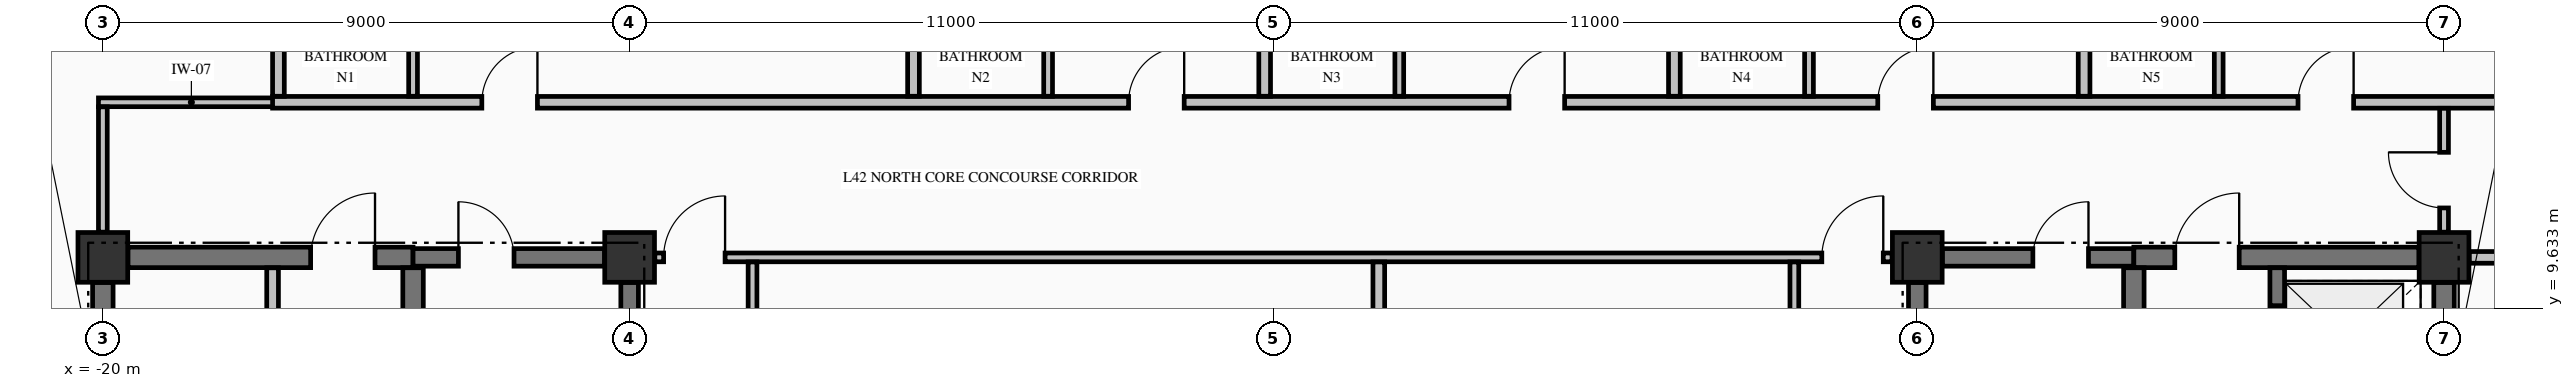
"""IFC4 building model, lengths in metres.
Left out: names, types, materials, properties, quantities, classifications, styles, units other than length and angle.
Written with IfcOpenShell. Run it as: python <this file> out.ifc"""

import sys

from ifc_helpers import new_model, si_unit, direction, frame, frame_2d, origin, origin_2d, place, context, subcontext, project, spatial, rectangle, extrude, element, fill, save


model = new_model("IFC4")
c1 = context("Model", 3, precision=1e-05, world=origin(), true_north=direction((0.0, 1.0)))
c2 = subcontext(c1, "Body", "Model", "MODEL_VIEW")
j1 = project(units=[si_unit("LENGTHUNIT", "METRE"), si_unit("PLANEANGLEUNIT", "RADIAN")], contexts=[c1])
p1 = place(None, origin())
s1 = spatial("IfcSite", under=j1, at=p1, CompositionType="ELEMENT")
p2 = place(p1, origin())
s2 = spatial("IfcBuilding", under=s1, at=p2, CompositionType="ELEMENT")
p3 = place(p2, frame((0.0, 0.0, 166.06)))
s3 = spatial("IfcBuildingStorey", under=s2, at=p3, CompositionType="ELEMENT", Elevation=166.06)
for number, where, z_axis, x_axis in (
    (1, (-20.0, 10.5, -0.25), (0.0, 0.0, 1.0), (1.0, 0.0, 0.0)),
    (2, (-11.0, 10.5, -0.25), (0.0, 0.0, 1.0), (1.0, 0.0, 0.0)),
    (3, (11.0, 10.5, -0.25), (0.0, 0.0, 1.0), (1.0, 0.0, 0.0)),
    (4, (20.0, 10.5, -0.25), (0.0, 0.0, 1.0), (1.0, 0.0, 0.0)),
):
    element("IfcColumn", number, at=place(p3, frame(where, z_axis=z_axis, x_axis=x_axis)), inside=s3, PredefinedType="COLUMN", context=c2, shape_type="SweptSolid", body=[
        extrude(rectangle(XDim=0.85, YDim=0.85, at=origin_2d()), origin(), (0.0, 0.0, 1.0), 3.4),
    ])
p4 = place(p3, frame((-19.571, 10.5, 0.0), z_axis=(0.0, 0.0, 1.0), x_axis=(1.0, 0.0, 0.0)))
e5 = element("IfcWall", 5, at=p4, inside=s3, PredefinedType="SHEAR", context=c2, shape_type="SweptSolid", body=[
    extrude(rectangle(XDim=4.871, YDim=0.35, at=frame_2d((2.436, 0.0))), origin(), (0.0, 0.0, 1.0), 3.15),
])
p5 = place(p4, frame((3.121, 0.0, 0.0)))
e6 = element("IfcOpeningElement", 6, at=p5, cuts=e5, PredefinedType="OPENING", context=c2, shape_type="SweptSolid", body=[
    extrude(rectangle(XDim=1.1, YDim=2.15, at=frame_2d((0.55, 1.075))), frame((0.0, 0.185, 0.0), z_axis=(0.0, -1.0, 0.0), x_axis=(1.0, 0.0, 0.0)), (0.0, 0.0, 1.0), 0.37),
])
p6 = place(p3, frame((-14.7, 10.5, 0.0), z_axis=(0.0, 0.0, 1.0), x_axis=(1.0, 0.0, 0.0)))
e7 = element("IfcWall", 7, at=p6, inside=s3, PredefinedType="SHEAR", context=c2, shape_type="SweptSolid", body=[
    extrude(rectangle(XDim=3.271, YDim=0.3, at=frame_2d((1.635, 0.0))), origin(), (0.0, 0.0, 1.0), 3.15),
])
p7 = place(p6, frame((0.775, 0.0, 0.0)))
e8 = element("IfcOpeningElement", 8, at=p7, cuts=e7, PredefinedType="OPENING", context=c2, shape_type="SweptSolid", body=[
    extrude(rectangle(XDim=0.95, YDim=2.15, at=frame_2d((0.475, 1.075))), frame((0.0, 0.16, 0.0), z_axis=(0.0, -1.0, 0.0), x_axis=(1.0, 0.0, 0.0)), (0.0, 0.0, 1.0), 0.32),
])
p8 = place(p3, frame((11.429, 10.5, 0.0), z_axis=(0.0, 0.0, 1.0), x_axis=(1.0, 0.0, 0.0)))
e9 = element("IfcWall", 9, at=p8, inside=s3, PredefinedType="SHEAR", context=c2, shape_type="SweptSolid", body=[
    extrude(rectangle(XDim=3.271, YDim=0.3, at=frame_2d((1.635, 0.0))), origin(), (0.0, 0.0, 1.0), 3.15),
])
p9 = place(p8, frame((1.546, 0.0, 0.0)))
e10 = element("IfcOpeningElement", 10, at=p9, cuts=e9, PredefinedType="OPENING", context=c2, shape_type="SweptSolid", body=[
    extrude(rectangle(XDim=0.95, YDim=2.15, at=frame_2d((0.475, 1.075))), frame((0.0, 0.16, 0.0), z_axis=(0.0, -1.0, 0.0), x_axis=(1.0, 0.0, 0.0)), (0.0, 0.0, 1.0), 0.32),
])
p10 = place(p3, frame((14.7, 10.5, 0.0), z_axis=(0.0, 0.0, 1.0), x_axis=(1.0, 0.0, 0.0)))
e11 = element("IfcWall", 11, at=p10, inside=s3, PredefinedType="SHEAR", context=c2, shape_type="SweptSolid", body=[
    extrude(rectangle(XDim=4.871, YDim=0.35, at=frame_2d((2.436, 0.0))), origin(), (0.0, 0.0, 1.0), 3.15),
])
p11 = place(p10, frame((0.7, 0.0, 0.0)))
e12 = element("IfcOpeningElement", 12, at=p11, cuts=e11, PredefinedType="OPENING", context=c2, shape_type="SweptSolid", body=[
    extrude(rectangle(XDim=1.1, YDim=2.15, at=frame_2d((0.55, 1.075))), frame((0.0, 0.185, 0.0), z_axis=(0.0, -1.0, 0.0), x_axis=(1.0, 0.0, 0.0)), (0.0, 0.0, 1.0), 0.37),
])
p12 = place(p3, frame((-10.569, 10.5, 0.0), z_axis=(0.0, 0.0, 1.0), x_axis=(1.0, 0.0, 0.0)))
e13 = element("IfcWall", 13, at=p12, inside=s3, PredefinedType="PARTITIONING", context=c2, shape_type="SweptSolid", body=[
    extrude(rectangle(XDim=21.138, YDim=0.15, at=frame_2d((10.569, 0.0))), origin(), (0.0, 0.0, 1.0), 3.15),
])
p13 = place(p12, frame((0.15, 0.0, 0.0)))
e14 = element("IfcOpeningElement", 14, at=p13, cuts=e13, PredefinedType="OPENING", context=c2, shape_type="SweptSolid", body=[
    extrude(rectangle(XDim=1.05, YDim=2.15, at=frame_2d((0.525, 1.075))), frame((0.0, 0.085, 0.0), z_axis=(0.0, -1.0, 0.0), x_axis=(1.0, 0.0, 0.0)), (0.0, 0.0, 1.0), 0.17),
])
p14 = place(p12, frame((19.938, 0.0, 0.0)))
e15 = element("IfcOpeningElement", 15, at=p14, cuts=e13, PredefinedType="OPENING", context=c2, shape_type="SweptSolid", body=[
    extrude(rectangle(XDim=1.05, YDim=2.15, at=frame_2d((0.525, 1.075))), frame((0.0, 0.085, 0.0), z_axis=(0.0, -1.0, 0.0), x_axis=(1.0, 0.0, 0.0)), (0.0, 0.0, 1.0), 0.17),
])
p15 = place(p3, frame((20.431, 10.5, 0.0), z_axis=(0.0, 0.0, 1.0), x_axis=(1.0, 0.0, 0.0)))
e16 = element("IfcWall", 16, at=p15, inside=s3, PredefinedType="PARTITIONING", context=c2, shape_type="SweptSolid", body=[
    extrude(rectangle(XDim=6.404, YDim=0.2, at=frame_2d((3.202, 0.0))), origin(), (0.0, 0.0, 1.0), 3.15),
])
p16 = place(p15, frame((2.594, 0.0, 0.0)))
e17 = element("IfcOpeningElement", 17, at=p16, cuts=e16, PredefinedType="OPENING", context=c2, shape_type="SweptSolid", body=[
    extrude(rectangle(XDim=0.95, YDim=2.15, at=frame_2d((0.475, 1.075))), frame((0.0, 0.11, 0.0), z_axis=(0.0, -1.0, 0.0), x_axis=(1.0, 0.0, 0.0)), (0.0, 0.0, 1.0), 0.22),
])
p17 = place(p3, frame((-20.075, 13.15, 0.0), z_axis=(0.0, 0.0, 1.0), x_axis=(1.0, 0.0, 0.0)))
e18 = element("IfcWall", 18, at=p17, inside=s3, PredefinedType="PARTITIONING", context=c2, shape_type="SweptSolid", body=[
    extrude(rectangle(XDim=3.175, YDim=0.15, at=frame_2d((1.587, 0.0))), origin(), (0.0, 0.0, 1.0), 3.15),
])
p18 = place(p3, frame((-17.1, 13.15, 0.0), z_axis=(0.0, 0.0, 1.0), x_axis=(1.0, 0.0, 0.0)))
e19 = element("IfcWall", 19, at=p18, inside=s3, PredefinedType="PARTITIONING", context=c2, shape_type="SweptSolid", body=[
    extrude(rectangle(XDim=39.2, YDim=0.2, at=frame_2d((19.6, 0.0))), origin(), (0.0, 0.0, 1.0), 3.15),
])
p19 = place(p18, frame((3.575, 0.0, 0.0)))
e20 = element("IfcOpeningElement", 20, at=p19, cuts=e19, PredefinedType="OPENING", context=c2, shape_type="SweptSolid", body=[
    extrude(rectangle(XDim=0.95, YDim=2.15, at=frame_2d((0.475, 1.075))), frame((0.0, 0.11, 0.0), z_axis=(0.0, -1.0, 0.0), x_axis=(1.0, 0.0, 0.0)), (0.0, 0.0, 1.0), 0.22),
])
p20 = place(p18, frame((14.625, 0.0, 0.0)))
e21 = element("IfcOpeningElement", 21, at=p20, cuts=e19, PredefinedType="OPENING", context=c2, shape_type="SweptSolid", body=[
    extrude(rectangle(XDim=0.95, YDim=2.15, at=frame_2d((0.475, 1.075))), frame((0.0, 0.11, 0.0), z_axis=(0.0, -1.0, 0.0), x_axis=(1.0, 0.0, 0.0)), (0.0, 0.0, 1.0), 0.22),
])
p21 = place(p18, frame((21.125, 0.0, 0.0)))
e22 = element("IfcOpeningElement", 22, at=p21, cuts=e19, PredefinedType="OPENING", context=c2, shape_type="SweptSolid", body=[
    extrude(rectangle(XDim=0.95, YDim=2.15, at=frame_2d((0.475, 1.075))), frame((0.0, 0.11, 0.0), z_axis=(0.0, -1.0, 0.0), x_axis=(1.0, 0.0, 0.0)), (0.0, 0.0, 1.0), 0.22),
])
p22 = place(p18, frame((27.425, 0.0, 0.0)))
e23 = element("IfcOpeningElement", 23, at=p22, cuts=e19, PredefinedType="OPENING", context=c2, shape_type="SweptSolid", body=[
    extrude(rectangle(XDim=0.95, YDim=2.15, at=frame_2d((0.475, 1.075))), frame((0.0, 0.11, 0.0), z_axis=(0.0, -1.0, 0.0), x_axis=(1.0, 0.0, 0.0)), (0.0, 0.0, 1.0), 0.22),
])
p23 = place(p18, frame((34.605, 0.0, 0.0)))
e24 = element("IfcOpeningElement", 24, at=p23, cuts=e19, PredefinedType="OPENING", context=c2, shape_type="SweptSolid", body=[
    extrude(rectangle(XDim=0.95, YDim=2.15, at=frame_2d((0.475, 1.075))), frame((0.0, 0.11, 0.0), z_axis=(0.0, -1.0, 0.0), x_axis=(1.0, 0.0, 0.0)), (0.0, 0.0, 1.0), 0.22),
])
p24 = place(p3, frame((-20.0, 5.327, 0.0), z_axis=(0.0, 0.0, 1.0), x_axis=(0.0, 1.0, 0.0)))
e25 = element("IfcWall", 25, at=p24, inside=s3, PredefinedType="SHEAR", context=c2, shape_type="SweptSolid", body=[
    extrude(rectangle(XDim=4.744, YDim=0.35, at=frame_2d((2.372, 0.0))), origin(), (0.0, 0.0, 1.0), 3.15),
])
p25 = place(p3, frame((-14.7, 5.852, 0.0), z_axis=(0.0, 0.0, 1.0), x_axis=(0.0, 1.0, 0.0)))
e26 = element("IfcWall", 26, at=p25, inside=s3, PredefinedType="SHEAR", context=c2, shape_type="SweptSolid", body=[
    extrude(rectangle(XDim=4.471, YDim=0.35, at=frame_2d((2.235, 0.0))), origin(), (0.0, 0.0, 1.0), 3.15),
])
for number, where, z_axis, x_axis in (
    (27, (-11.0, 5.852, 0.0), (0.0, 0.0, 1.0), (0.0, 1.0, 0.0)),
    (28, (11.0, 5.852, 0.0), (0.0, 0.0, 1.0), (0.0, 1.0, 0.0)),
):
    element("IfcWall", number, at=place(p3, frame(where, z_axis=z_axis, x_axis=x_axis)), inside=s3, PredefinedType="SHEAR", context=c2, shape_type="SweptSolid", body=[
        extrude(rectangle(XDim=4.219, YDim=0.3, at=frame_2d((2.109, 0.0))), origin(), (0.0, 0.0, 1.0), 3.15),
    ])
p26 = place(p3, frame((14.7, 5.852, 0.0), z_axis=(0.0, 0.0, 1.0), x_axis=(0.0, 1.0, 0.0)))
e29 = element("IfcWall", 29, at=p26, inside=s3, PredefinedType="SHEAR", context=c2, shape_type="SweptSolid", body=[
    extrude(rectangle(XDim=4.471, YDim=0.35, at=frame_2d((2.235, 0.0))), origin(), (0.0, 0.0, 1.0), 3.15),
])
p27 = place(p3, frame((17.15, 7.877, 0.0), z_axis=(0.0, 0.0, 1.0), x_axis=(0.0, 1.0, 0.0)))
e30 = element("IfcWall", 30, at=p27, inside=s3, PredefinedType="SOLIDWALL", context=c2, shape_type="SweptSolid", body=[
    extrude(rectangle(XDim=2.446, YDim=0.25, at=frame_2d((1.223, 0.0))), origin(), (0.0, 0.0, 1.0), 3.15),
])
p28 = place(p27, frame((0.698, 0.0, 0.0)))
e31 = element("IfcOpeningElement", 31, at=p28, cuts=e30, PredefinedType="OPENING", context=c2, shape_type="SweptSolid", body=[
    extrude(rectangle(XDim=1.1, YDim=2.2, at=frame_2d((0.55, 1.1))), frame((0.0, 0.135, 0.0), z_axis=(0.0, -1.0, 0.0), x_axis=(1.0, 0.0, 0.0)), (0.0, 0.0, 1.0), 0.27),
])
p29 = place(p3, frame((20.0, 7.877, 0.0), z_axis=(0.0, 0.0, 1.0), x_axis=(0.0, 1.0, 0.0)))
e32 = element("IfcWall", 32, at=p29, inside=s3, PredefinedType="SHEAR", context=c2, shape_type="SweptSolid", body=[
    extrude(rectangle(XDim=2.194, YDim=0.35, at=frame_2d((1.097, 0.0))), origin(), (0.0, 0.0, 1.0), 3.15),
])
p30 = place(p3, frame((-20.0, 10.931, 0.0), z_axis=(0.0, 0.0, 1.0), x_axis=(0.0, 1.0, 0.0)))
e33 = element("IfcWall", 33, at=p30, inside=s3, PredefinedType="PARTITIONING", context=c2, shape_type="SweptSolid", body=[
    extrude(rectangle(XDim=2.141, YDim=0.15, at=frame_2d((1.071, 0.0))), origin(), (0.0, 0.0, 1.0), 2.342),
])
p31 = place(p3, frame((-17.1, 5.328, 0.0), z_axis=(0.0, 0.0, 1.0), x_axis=(0.0, 1.0, 0.0)))
e34 = element("IfcWall", 34, at=p31, inside=s3, PredefinedType="PARTITIONING", context=c2, shape_type="SweptSolid", body=[
    extrude(rectangle(XDim=4.994, YDim=0.2, at=frame_2d((2.497, 0.0))), origin(), (0.0, 0.0, 1.0), 3.15),
])
p32 = place(p31, frame((2.072, 0.0, 0.0)))
e35 = element("IfcOpeningElement", 35, at=p32, cuts=e34, PredefinedType="OPENING", context=c2, shape_type="SweptSolid", body=[
    extrude(rectangle(XDim=0.9, YDim=2.15, at=frame_2d((0.45, 1.075))), frame((0.0, 0.11, 0.0), z_axis=(0.0, -1.0, 0.0), x_axis=(1.0, 0.0, 0.0)), (0.0, 0.0, 1.0), 0.22),
])
p33 = place(p3, frame((-17.0, 13.253, 0.0), z_axis=(0.0, 0.0, 1.0), x_axis=(0.0, 1.0, 0.0)))
e36 = element("IfcWall", 36, at=p33, inside=s3, PredefinedType="PARTITIONING", context=c2, shape_type="SweptSolid", body=[
    extrude(rectangle(XDim=2.669, YDim=0.2, at=frame_2d((1.334, 0.0))), origin(), (0.0, 0.0, 1.0), 3.15),
])
p34 = place(p3, frame((-14.7, 13.253, 0.0), z_axis=(0.0, 0.0, 1.0), x_axis=(0.0, 1.0, 0.0)))
e37 = element("IfcWall", 37, at=p34, inside=s3, PredefinedType="PARTITIONING", context=c2, shape_type="SweptSolid", body=[
    extrude(rectangle(XDim=2.669, YDim=0.15, at=frame_2d((1.334, 0.0))), origin(), (0.0, 0.0, 1.0), 3.15),
])
p35 = place(p3, frame((-8.9, -3.297, 0.0), z_axis=(0.0, 0.0, 1.0), x_axis=(0.0, 1.0, 0.0)))
e38 = element("IfcWall", 38, at=p35, inside=s3, PredefinedType="PARTITIONING", context=c2, shape_type="SweptSolid", body=[
    extrude(rectangle(XDim=13.719, YDim=0.15, at=frame_2d((6.86, 0.0))), origin(), (0.0, 0.0, 1.0), 3.15),
])
p36 = place(p35, frame((6.297, 0.0, 0.0)))
e39 = element("IfcOpeningElement", 39, at=p36, cuts=e38, PredefinedType="OPENING", context=c2, shape_type="SweptSolid", body=[
    extrude(rectangle(XDim=1.1, YDim=2.15, at=frame_2d((0.55, 1.075))), frame((0.0, 0.085, 0.0), z_axis=(0.0, -1.0, 0.0), x_axis=(1.0, 0.0, 0.0)), (0.0, 0.0, 1.0), 0.17),
])
p37 = place(p3, frame((-6.15, 13.253, 0.0), z_axis=(0.0, 0.0, 1.0), x_axis=(0.0, 1.0, 0.0)))
e40 = element("IfcWall", 40, at=p37, inside=s3, PredefinedType="PARTITIONING", context=c2, shape_type="SweptSolid", body=[
    extrude(rectangle(XDim=2.669, YDim=0.2, at=frame_2d((1.334, 0.0))), origin(), (0.0, 0.0, 1.0), 3.15),
])
p38 = place(p3, frame((-3.85, 13.253, 0.0), z_axis=(0.0, 0.0, 1.0), x_axis=(0.0, 1.0, 0.0)))
e41 = element("IfcWall", 41, at=p38, inside=s3, PredefinedType="PARTITIONING", context=c2, shape_type="SweptSolid", body=[
    extrude(rectangle(XDim=2.669, YDim=0.15, at=frame_2d((1.334, 0.0))), origin(), (0.0, 0.0, 1.0), 3.15),
])
p39 = place(p3, frame((-0.15, 13.253, 0.0), z_axis=(0.0, 0.0, 1.0), x_axis=(0.0, 1.0, 0.0)))
e42 = element("IfcWall", 42, at=p39, inside=s3, PredefinedType="PARTITIONING", context=c2, shape_type="SweptSolid", body=[
    extrude(rectangle(XDim=2.669, YDim=0.2, at=frame_2d((1.334, 0.0))), origin(), (0.0, 0.0, 1.0), 2.342),
])
p40 = place(p3, frame((1.8, -2.097, 0.0), z_axis=(0.0, 0.0, 1.0), x_axis=(0.0, 1.0, 0.0)))
e43 = element("IfcWall", 43, at=p40, inside=s3, PredefinedType="PARTITIONING", context=c2, shape_type="SweptSolid", body=[
    extrude(rectangle(XDim=12.519, YDim=0.2, at=frame_2d((6.26, 0.0))), origin(), (0.0, 0.0, 1.0), 3.15),
])
p41 = place(p3, frame((2.15, 13.253, 0.0), z_axis=(0.0, 0.0, 1.0), x_axis=(0.0, 1.0, 0.0)))
e44 = element("IfcWall", 44, at=p41, inside=s3, PredefinedType="PARTITIONING", context=c2, shape_type="SweptSolid", body=[
    extrude(rectangle(XDim=2.669, YDim=0.15, at=frame_2d((1.334, 0.0))), origin(), (0.0, 0.0, 1.0), 3.15),
])
p42 = place(p3, frame((6.85, 13.253, 0.0), z_axis=(0.0, 0.0, 1.0), x_axis=(0.0, 1.0, 0.0)))
e45 = element("IfcWall", 45, at=p42, inside=s3, PredefinedType="PARTITIONING", context=c2, shape_type="SweptSolid", body=[
    extrude(rectangle(XDim=2.669, YDim=0.2, at=frame_2d((1.334, 0.0))), origin(), (0.0, 0.0, 1.0), 3.15),
])
p43 = place(p3, frame((8.9, -2.097, 0.0), z_axis=(0.0, 0.0, 1.0), x_axis=(0.0, 1.0, 0.0)))
e46 = element("IfcWall", 46, at=p43, inside=s3, PredefinedType="PARTITIONING", context=c2, shape_type="SweptSolid", body=[
    extrude(rectangle(XDim=12.519, YDim=0.15, at=frame_2d((6.26, 0.0))), origin(), (0.0, 0.0, 1.0), 3.15),
])
p44 = place(p43, frame((5.697, 0.0, 0.0)))
e47 = element("IfcOpeningElement", 47, at=p44, cuts=e46, PredefinedType="OPENING", context=c2, shape_type="SweptSolid", body=[
    extrude(rectangle(XDim=1.1, YDim=2.15, at=frame_2d((0.55, 1.075))), frame((0.0, 0.085, 0.0), z_axis=(0.0, -1.0, 0.0), x_axis=(1.0, 0.0, 0.0)), (0.0, 0.0, 1.0), 0.17),
])
p45 = place(p3, frame((9.15, 13.253, 0.0), z_axis=(0.0, 0.0, 1.0), x_axis=(0.0, 1.0, 0.0)))
e48 = element("IfcWall", 48, at=p45, inside=s3, PredefinedType="PARTITIONING", context=c2, shape_type="SweptSolid", body=[
    extrude(rectangle(XDim=2.669, YDim=0.15, at=frame_2d((1.334, 0.0))), origin(), (0.0, 0.0, 1.0), 3.15),
])
p46 = place(p3, frame((13.85, 13.253, 0.0), z_axis=(0.0, 0.0, 1.0), x_axis=(0.0, 1.0, 0.0)))
e49 = element("IfcWall", 49, at=p46, inside=s3, PredefinedType="PARTITIONING", context=c2, shape_type="SweptSolid", body=[
    extrude(rectangle(XDim=2.669, YDim=0.2, at=frame_2d((1.334, 0.0))), origin(), (0.0, 0.0, 1.0), 3.15),
])
p47 = place(p3, frame((16.15, 13.253, 0.0), z_axis=(0.0, 0.0, 1.0), x_axis=(0.0, 1.0, 0.0)))
e50 = element("IfcWall", 50, at=p47, inside=s3, PredefinedType="PARTITIONING", context=c2, shape_type="SweptSolid", body=[
    extrude(rectangle(XDim=2.669, YDim=0.15, at=frame_2d((1.334, 0.0))), origin(), (0.0, 0.0, 1.0), 3.15),
])
p48 = place(p3, frame((20.0, 10.931, 0.0), z_axis=(0.0, 0.0, 1.0), x_axis=(0.0, 1.0, 0.0)))
e51 = element("IfcWall", 51, at=p48, inside=s3, PredefinedType="PARTITIONING", context=c2, shape_type="SweptSolid", body=[
    extrude(rectangle(XDim=2.116, YDim=0.15, at=frame_2d((1.058, 0.0))), origin(), (0.0, 0.0, 1.0), 2.342),
])
p49 = place(p48, frame((0.414, 0.0, 0.0)))
e52 = element("IfcOpeningElement", 52, at=p49, cuts=e51, PredefinedType="OPENING", context=c2, shape_type="SweptSolid", body=[
    extrude(rectangle(XDim=0.95, YDim=2.15, at=frame_2d((0.475, 1.075))), frame((0.0, 0.085, 0.0), z_axis=(0.0, -1.0, 0.0), x_axis=(1.0, 0.0, 0.0)), (0.0, 0.0, 1.0), 0.17),
])
p50 = place(p7, origin())
e53 = element("IfcDoor", 53, at=p50, inside=s3, OperationType="SINGLE_SWING_LEFT", PredefinedType="DOOR", context=c2, shape_type="SweptSolid", body=[
    extrude(rectangle(XDim=0.95, YDim=2.15, at=frame_2d((0.475, 1.075))), frame((0.0, 0.025, 0.0), z_axis=(0.0, -1.0, 0.0), x_axis=(1.0, 0.0, 0.0)), (0.0, 0.0, 1.0), 0.05),
])
fill(e8, e53)
p51 = place(p9, origin())
e54 = element("IfcDoor", 54, at=p51, inside=s3, OperationType="SINGLE_SWING_RIGHT", PredefinedType="DOOR", context=c2, shape_type="SweptSolid", body=[
    extrude(rectangle(XDim=0.95, YDim=2.15, at=frame_2d((0.475, 1.075))), frame((0.0, 0.025, 0.0), z_axis=(0.0, -1.0, 0.0), x_axis=(1.0, 0.0, 0.0)), (0.0, 0.0, 1.0), 0.05),
])
fill(e10, e54)
p52 = place(p5, origin())
e55 = element("IfcDoor", 55, at=p52, inside=s3, OperationType="SINGLE_SWING_RIGHT", PredefinedType="DOOR", context=c2, shape_type="SweptSolid", body=[
    extrude(rectangle(XDim=1.1, YDim=2.15, at=frame_2d((0.55, 1.075))), frame((0.0, 0.025, 0.0), z_axis=(0.0, -1.0, 0.0), x_axis=(1.0, 0.0, 0.0)), (0.0, 0.0, 1.0), 0.05),
])
fill(e6, e55)
p53 = place(p28, origin())
e56 = element("IfcDoor", 56, at=p53, inside=s3, OperationType="SLIDING_TO_RIGHT", PredefinedType="DOOR", context=c2, shape_type="SweptSolid", body=[
    extrude(rectangle(XDim=1.1, YDim=2.2, at=frame_2d((0.55, 1.1))), frame((0.0, 0.025, 0.0), z_axis=(0.0, -1.0, 0.0), x_axis=(1.0, 0.0, 0.0)), (0.0, 0.0, 1.0), 0.05),
])
fill(e31, e56)
p54 = place(p11, origin())
e57 = element("IfcDoor", 57, at=p54, inside=s3, OperationType="SINGLE_SWING_RIGHT", PredefinedType="DOOR", context=c2, shape_type="SweptSolid", body=[
    extrude(rectangle(XDim=1.1, YDim=2.15, at=frame_2d((0.55, 1.075))), frame((0.0, 0.025, 0.0), z_axis=(0.0, -1.0, 0.0), x_axis=(1.0, 0.0, 0.0)), (0.0, 0.0, 1.0), 0.05),
])
fill(e12, e57)
p55 = place(p13, origin())
e58 = element("IfcDoor", 58, at=p55, inside=s3, OperationType="SINGLE_SWING_RIGHT", PredefinedType="DOOR", context=c2, shape_type="SweptSolid", body=[
    extrude(rectangle(XDim=1.05, YDim=2.15, at=frame_2d((0.525, 1.075))), frame((0.0, 0.025, 0.0), z_axis=(0.0, -1.0, 0.0), x_axis=(1.0, 0.0, 0.0)), (0.0, 0.0, 1.0), 0.05),
])
fill(e14, e58)
p56 = place(p14, origin())
e59 = element("IfcDoor", 59, at=p56, inside=s3, OperationType="SINGLE_SWING_RIGHT", PredefinedType="DOOR", context=c2, shape_type="SweptSolid", body=[
    extrude(rectangle(XDim=1.05, YDim=2.15, at=frame_2d((0.525, 1.075))), frame((0.0, 0.025, 0.0), z_axis=(0.0, -1.0, 0.0), x_axis=(1.0, 0.0, 0.0)), (0.0, 0.0, 1.0), 0.05),
])
fill(e15, e59)
p57 = place(p19, origin())
e60 = element("IfcDoor", 60, at=p57, inside=s3, OperationType="SINGLE_SWING_RIGHT", PredefinedType="DOOR", context=c2, shape_type="SweptSolid", body=[
    extrude(rectangle(XDim=0.95, YDim=2.15, at=frame_2d((0.475, 1.075))), frame((0.0, 0.025, 0.0), z_axis=(0.0, -1.0, 0.0), x_axis=(1.0, 0.0, 0.0)), (0.0, 0.0, 1.0), 0.05),
])
fill(e20, e60)
p58 = place(p20, origin())
e61 = element("IfcDoor", 61, at=p58, inside=s3, OperationType="SINGLE_SWING_RIGHT", PredefinedType="DOOR", context=c2, shape_type="SweptSolid", body=[
    extrude(rectangle(XDim=0.95, YDim=2.15, at=frame_2d((0.475, 1.075))), frame((0.0, 0.025, 0.0), z_axis=(0.0, -1.0, 0.0), x_axis=(1.0, 0.0, 0.0)), (0.0, 0.0, 1.0), 0.05),
])
fill(e21, e61)
p59 = place(p21, origin())
e62 = element("IfcDoor", 62, at=p59, inside=s3, OperationType="SINGLE_SWING_RIGHT", PredefinedType="DOOR", context=c2, shape_type="SweptSolid", body=[
    extrude(rectangle(XDim=0.95, YDim=2.15, at=frame_2d((0.475, 1.075))), frame((0.0, 0.025, 0.0), z_axis=(0.0, -1.0, 0.0), x_axis=(1.0, 0.0, 0.0)), (0.0, 0.0, 1.0), 0.05),
])
fill(e22, e62)
p60 = place(p22, origin())
e63 = element("IfcDoor", 63, at=p60, inside=s3, OperationType="SINGLE_SWING_RIGHT", PredefinedType="DOOR", context=c2, shape_type="SweptSolid", body=[
    extrude(rectangle(XDim=0.95, YDim=2.15, at=frame_2d((0.475, 1.075))), frame((0.0, 0.025, 0.0), z_axis=(0.0, -1.0, 0.0), x_axis=(1.0, 0.0, 0.0)), (0.0, 0.0, 1.0), 0.05),
])
fill(e23, e63)
p61 = place(p23, origin())
e64 = element("IfcDoor", 64, at=p61, inside=s3, OperationType="SINGLE_SWING_RIGHT", PredefinedType="DOOR", context=c2, shape_type="SweptSolid", body=[
    extrude(rectangle(XDim=0.95, YDim=2.15, at=frame_2d((0.475, 1.075))), frame((0.0, 0.025, 0.0), z_axis=(0.0, -1.0, 0.0), x_axis=(1.0, 0.0, 0.0)), (0.0, 0.0, 1.0), 0.05),
])
fill(e24, e64)
p62 = place(p49, origin())
e65 = element("IfcDoor", 65, at=p62, inside=s3, OperationType="SINGLE_SWING_RIGHT", PredefinedType="DOOR", context=c2, shape_type="SweptSolid", body=[
    extrude(rectangle(XDim=0.95, YDim=2.15, at=frame_2d((0.475, 1.075))), frame((0.0, 0.025, 0.0), z_axis=(0.0, -1.0, 0.0), x_axis=(1.0, 0.0, 0.0)), (0.0, 0.0, 1.0), 0.05),
])
fill(e52, e65)
save(model, sys.argv[1])
